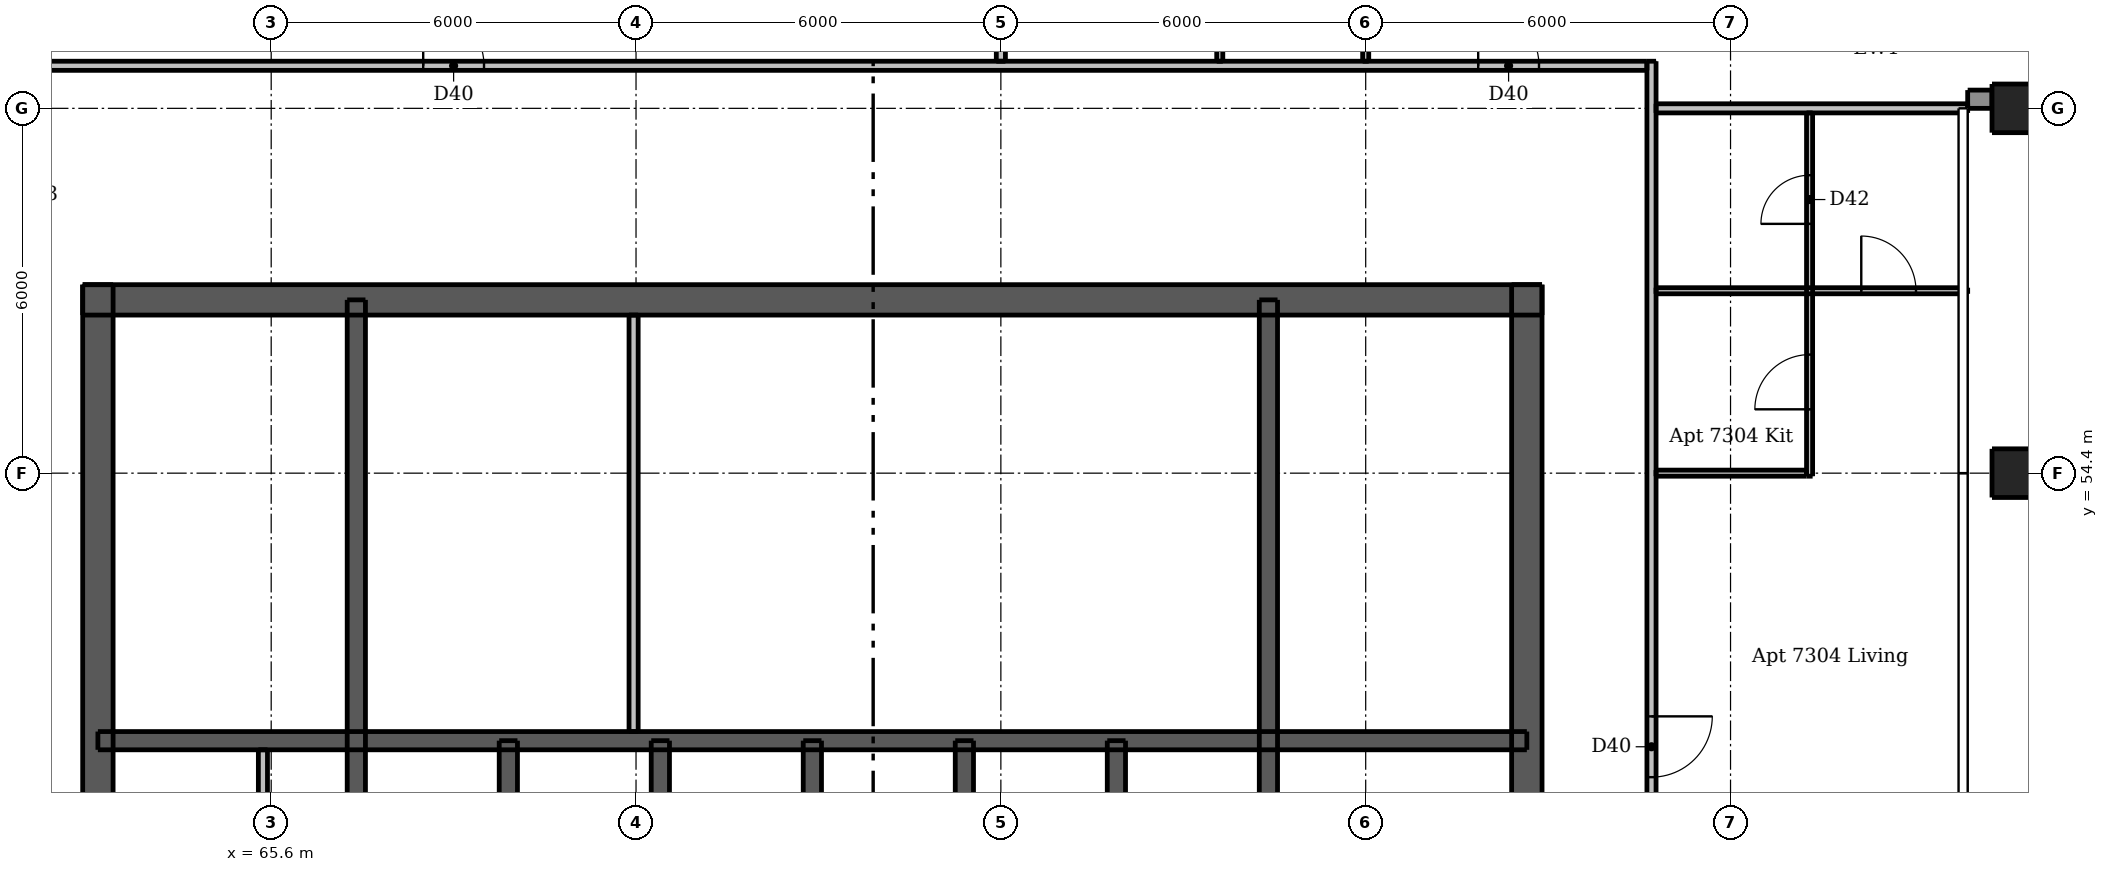
"""IFC4 building model, lengths in metres.
Left out: names, types, materials, properties, quantities, classifications, styles, units other than length and angle.
Written with IfcOpenShell. Run it as: python <this file> out.ifc"""

import sys

from ifc_helpers import new_model, si_unit, direction, frame, frame_2d, origin, origin_2d, place, context, subcontext, project, spatial, rectangle, extrude, element, fill, save


model = new_model("IFC4")
c1 = context("Model", 3, precision=1e-05, world=origin(), true_north=direction((0.0, 1.0)))
c2 = subcontext(c1, "Body", "Model", "MODEL_VIEW")
j1 = project(units=[si_unit("LENGTHUNIT", "METRE"), si_unit("PLANEANGLEUNIT", "RADIAN")], contexts=[c1])
p1 = place(None, origin())
s1 = spatial("IfcSite", under=j1, at=p1, CompositionType="ELEMENT")
p2 = place(p1, origin())
s2 = spatial("IfcBuilding", under=s1, at=p2, CompositionType="ELEMENT")
p3 = place(p2, frame((0.0, 0.0, 271.9)))
s3 = spatial("IfcBuildingStorey", under=s2, at=p3, CompositionType="ELEMENT", Elevation=271.9)
p4 = place(p3, frame((62.5, 57.25, 0.0), z_axis=(0.0, 0.0, 1.0), x_axis=(1.0, 0.0, 0.0)))
e1 = element("IfcWall", 1, at=p4, inside=s3, PredefinedType="SHEAR", context=c2, shape_type="SweptSolid", body=[
    extrude(rectangle(XDim=24.0, YDim=0.5, at=frame_2d((12.0, 0.0))), origin(), (0.0, 0.0, 1.0), 3.05),
])
p5 = place(p4, frame((21.025, 0.0, 0.0)))
e2 = element("IfcOpeningElement", 2, at=p5, cuts=e1, PredefinedType="OPENING", context=c2, shape_type="SweptSolid", body=[
    extrude(rectangle(XDim=1.1, YDim=2.1, at=frame_2d((0.55, 1.05))), frame((0.0, 0.26, 0.0), z_axis=(0.0, -1.0, 0.0), x_axis=(1.0, 0.0, 0.0)), (0.0, 0.0, 1.0), 0.52),
])
p6 = place(p4, frame((1.875, 0.0, 0.0)))
e3 = element("IfcOpeningElement", 3, at=p6, cuts=e1, PredefinedType="OPENING", context=c2, shape_type="SweptSolid", body=[
    extrude(rectangle(XDim=1.1, YDim=2.1, at=frame_2d((0.55, 1.05))), frame((0.0, 0.26, 0.0), z_axis=(0.0, -1.0, 0.0), x_axis=(1.0, 0.0, 0.0)), (0.0, 0.0, 1.0), 0.52),
])
p7 = place(p4, frame((6.405, 0.0, 0.0)))
e4 = element("IfcOpeningElement", 4, at=p7, cuts=e1, PredefinedType="OPENING", context=c2, shape_type="SweptSolid", body=[
    extrude(rectangle(XDim=0.9, YDim=2.1, at=frame_2d((0.45, 1.05))), frame((0.0, 0.26, 0.0), z_axis=(0.0, -1.0, 0.0), x_axis=(1.0, 0.0, 0.0)), (0.0, 0.0, 1.0), 0.52),
])
p8 = place(p4, frame((13.755, 0.0, 0.0)))
e5 = element("IfcOpeningElement", 5, at=p8, cuts=e1, PredefinedType="OPENING", context=c2, shape_type="SweptSolid", body=[
    extrude(rectangle(XDim=0.9, YDim=2.1, at=frame_2d((0.45, 1.05))), frame((0.0, 0.26, 0.0), z_axis=(0.0, -1.0, 0.0), x_axis=(1.0, 0.0, 0.0)), (0.0, 0.0, 1.0), 0.52),
])
p9 = place(p3, frame((62.75, 33.5, 0.0), z_axis=(0.0, 0.0, 1.0), x_axis=(0.0, 1.0, 0.0)))
e6 = element("IfcWall", 6, at=p9, inside=s3, PredefinedType="SHEAR", context=c2, shape_type="SweptSolid", body=[
    extrude(rectangle(XDim=24.0, YDim=0.5, at=frame_2d((12.0, 0.0))), origin(), (0.0, 0.0, 1.0), 3.05),
])
p10 = place(p9, frame((11.2, 0.0, 0.0)))
e7 = element("IfcOpeningElement", 7, at=p10, cuts=e6, PredefinedType="OPENING", context=c2, shape_type="SweptSolid", body=[
    extrude(rectangle(XDim=1.6, YDim=2.1, at=frame_2d((0.8, 1.05))), frame((0.0, 0.26, 0.0), z_axis=(0.0, -1.0, 0.0), x_axis=(1.0, 0.0, 0.0)), (0.0, 0.0, 1.0), 0.52),
])
p11 = place(p3, frame((86.25, 33.5, 0.0), z_axis=(0.0, 0.0, 1.0), x_axis=(0.0, 1.0, 0.0)))
e8 = element("IfcWall", 8, at=p11, inside=s3, PredefinedType="SHEAR", context=c2, shape_type="SweptSolid", body=[
    extrude(rectangle(XDim=24.0, YDim=0.5, at=frame_2d((12.0, 0.0))), origin(), (0.0, 0.0, 1.0), 3.05),
])
p12 = place(p11, frame((11.2, 0.0, 0.0)))
e9 = element("IfcOpeningElement", 9, at=p12, cuts=e8, PredefinedType="OPENING", context=c2, shape_type="SweptSolid", body=[
    extrude(rectangle(XDim=1.6, YDim=2.1, at=frame_2d((0.8, 1.05))), frame((0.0, 0.26, 0.0), z_axis=(0.0, -1.0, 0.0), x_axis=(1.0, 0.0, 0.0)), (0.0, 0.0, 1.0), 0.52),
])
p13 = place(p3, frame((62.75, 50.0, 0.0), z_axis=(0.0, 0.0, 1.0), x_axis=(1.0, 0.0, 0.0)))
e10 = element("IfcWall", 10, at=p13, inside=s3, PredefinedType="SHEAR", context=c2, shape_type="SweptSolid", body=[
    extrude(rectangle(XDim=23.5, YDim=0.3, at=frame_2d((11.75, 0.0))), origin(), (0.0, 0.0, 1.0), 3.05),
])
for number, where, z_axis, x_axis in (
    (11, (67.0, 47.1, 0.0), (0.0, 0.0, 1.0), (0.0, 1.0, 0.0)),
    (12, (82.0, 47.1, 0.0), (0.0, 0.0, 1.0), (0.0, 1.0, 0.0)),
):
    element("IfcWall", number, at=place(p3, frame(where, z_axis=z_axis, x_axis=x_axis)), inside=s3, PredefinedType="SHEAR", context=c2, shape_type="SweptSolid", body=[
        extrude(rectangle(XDim=10.15, YDim=0.3, at=frame_2d((5.075, 0.0))), origin(), (0.0, 0.0, 1.0), 3.05),
    ])
for number, where, z_axis, x_axis in (
    (13, (69.5, 47.1, 0.0), (0.0, 0.0, 1.0), (0.0, 1.0, 0.0)),
    (14, (72.0, 47.1, 0.0), (0.0, 0.0, 1.0), (0.0, 1.0, 0.0)),
    (15, (74.5, 47.1, 0.0), (0.0, 0.0, 1.0), (0.0, 1.0, 0.0)),
    (16, (77.0, 47.1, 0.0), (0.0, 0.0, 1.0), (0.0, 1.0, 0.0)),
    (17, (79.5, 47.1, 0.0), (0.0, 0.0, 1.0), (0.0, 1.0, 0.0)),
):
    element("IfcWall", number, at=place(p3, frame(where, z_axis=z_axis, x_axis=x_axis)), inside=s3, PredefinedType="SHEAR", context=c2, shape_type="SweptSolid", body=[
        extrude(rectangle(XDim=2.9, YDim=0.3, at=frame_2d((1.45, 0.0))), origin(), (0.0, 0.0, 1.0), 3.05),
    ])
for number, where, z_axis, x_axis in (
    (18, (94.3, 54.4, 0.0), (0.0, 0.0, 1.0), (1.0, 0.0, 0.0)),
    (19, (94.3, 60.4, 0.0), (0.0, 0.0, 1.0), (1.0, 0.0, 0.0)),
):
    element("IfcColumn", number, at=place(p3, frame(where, z_axis=z_axis, x_axis=x_axis)), inside=s3, PredefinedType="COLUMN", context=c2, shape_type="SweptSolid", body=[
        extrude(rectangle(XDim=0.8, YDim=0.8, at=origin_2d()), origin(), (0.0, 0.0, 1.0), 3.05),
    ])
p14 = place(p3, frame((93.5, 60.55, 0.0), z_axis=(0.0, 0.0, 1.0), x_axis=(1.0, 0.0, 0.0)))
e20 = element("IfcWall", 20, at=p14, inside=s3, PredefinedType="SOLIDWALL", context=c2, shape_type="SweptSolid", body=[
    extrude(rectangle(XDim=0.4, YDim=0.3, at=frame_2d((0.2, 0.0))), origin(), (0.0, 0.0, 1.0), 3.05),
])
p15 = place(p3, frame((65.464, 47.25, 0.0), z_axis=(0.0, 0.0, 1.0), x_axis=(0.0, 1.0, 0.0)))
e21 = element("IfcWall", 21, at=p15, inside=s3, PredefinedType="PLUMBINGWALL", context=c2, shape_type="SweptSolid", body=[
    extrude(rectangle(XDim=2.6, YDim=0.15, at=frame_2d((1.3, 0.0))), origin(), (0.0, 0.0, 1.0), 3.05),
])
p16 = place(p3, frame((71.56, 50.15, 0.0), z_axis=(0.0, 0.0, 1.0), x_axis=(0.0, 1.0, 0.0)))
e22 = element("IfcWall", 22, at=p16, inside=s3, PredefinedType="PLUMBINGWALL", context=c2, shape_type="SweptSolid", body=[
    extrude(rectangle(XDim=6.85, YDim=0.15, at=frame_2d((3.425, 0.0))), origin(), (0.0, 0.0, 1.0), 3.05),
])
p17 = place(p3, frame((81.2, 61.175, 0.0), z_axis=(0.0, 0.0, 1.0), x_axis=(0.0, 1.0, 0.0)))
e23 = element("IfcWall", 23, at=p17, inside=s3, PredefinedType="PARTITIONING", context=c2, shape_type="SweptSolid", body=[
    extrude(rectangle(XDim=1.975, YDim=0.1, at=frame_2d((0.987, 0.0))), origin(), (0.0, 0.0, 1.0), 3.05),
])
p18 = place(p3, frame((83.6, 61.175, 0.0), z_axis=(0.0, 0.0, 1.0), x_axis=(0.0, 1.0, 0.0)))
e24 = element("IfcWall", 24, at=p18, inside=s3, PredefinedType="PARTITIONING", context=c2, shape_type="SweptSolid", body=[
    extrude(rectangle(XDim=6.825, YDim=0.1, at=frame_2d((3.413, 0.0))), origin(), (0.0, 0.0, 1.0), 2.516),
])
p19 = place(p18, frame((0.525, 0.0, 0.0)))
e25 = element("IfcOpeningElement", 25, at=p19, cuts=e24, PredefinedType="OPENING", context=c2, shape_type="SweptSolid", body=[
    extrude(rectangle(XDim=0.9, YDim=2.1, at=frame_2d((0.45, 1.05))), frame((0.0, 0.06, 0.0), z_axis=(0.0, -1.0, 0.0), x_axis=(1.0, 0.0, 0.0)), (0.0, 0.0, 1.0), 0.12),
])
p20 = place(p18, frame((3.975, 0.0, 0.0)))
e26 = element("IfcOpeningElement", 26, at=p20, cuts=e24, PredefinedType="OPENING", context=c2, shape_type="SweptSolid", body=[
    extrude(rectangle(XDim=0.9, YDim=2.1, at=frame_2d((0.45, 1.05))), frame((0.0, 0.06, 0.0), z_axis=(0.0, -1.0, 0.0), x_axis=(1.0, 0.0, 0.0)), (0.0, 0.0, 1.0), 0.12),
])
p21 = place(p3, frame((90.9, 54.35, 0.0), z_axis=(0.0, 0.0, 1.0), x_axis=(0.0, 1.0, 0.0)))
e27 = element("IfcWall", 27, at=p21, inside=s3, PredefinedType="PARTITIONING", context=c2, shape_type="SweptSolid", body=[
    extrude(rectangle(XDim=5.975, YDim=0.1, at=frame_2d((2.987, 0.0))), origin(), (0.0, 0.0, 1.0), 3.05),
])
p22 = place(p21, frame((1.1, 0.0, 0.0)))
e28 = element("IfcOpeningElement", 28, at=p22, cuts=e27, PredefinedType="OPENING", context=c2, shape_type="SweptSolid", body=[
    extrude(rectangle(XDim=0.9, YDim=2.1, at=frame_2d((0.45, 1.05))), frame((0.0, 0.06, 0.0), z_axis=(0.0, -1.0, 0.0), x_axis=(1.0, 0.0, 0.0)), (0.0, 0.0, 1.0), 0.12),
])
p23 = place(p21, frame((4.15, 0.0, 0.0)))
e29 = element("IfcOpeningElement", 29, at=p23, cuts=e27, PredefinedType="OPENING", context=c2, shape_type="SweptSolid", body=[
    extrude(rectangle(XDim=0.8, YDim=2.1, at=frame_2d((0.4, 1.05))), frame((0.0, 0.06, 0.0), z_axis=(0.0, -1.0, 0.0), x_axis=(1.0, 0.0, 0.0)), (0.0, 0.0, 1.0), 0.12),
])
p24 = place(p3, frame((88.375, 57.4, 0.0), z_axis=(0.0, 0.0, 1.0), x_axis=(1.0, 0.0, 0.0)))
e30 = element("IfcWall", 30, at=p24, inside=s3, PredefinedType="PARTITIONING", context=c2, shape_type="SweptSolid", body=[
    extrude(rectangle(XDim=5.125, YDim=0.1, at=frame_2d((2.562, 0.0))), origin(), (0.0, 0.0, 1.0), 3.05),
])
p25 = place(p24, frame((3.375, 0.0, 0.0)))
e31 = element("IfcOpeningElement", 31, at=p25, cuts=e30, PredefinedType="OPENING", context=c2, shape_type="SweptSolid", body=[
    extrude(rectangle(XDim=0.9, YDim=2.1, at=frame_2d((0.45, 1.05))), frame((0.0, 0.06, 0.0), z_axis=(0.0, -1.0, 0.0), x_axis=(1.0, 0.0, 0.0)), (0.0, 0.0, 1.0), 0.12),
])
p26 = place(p3, frame((88.375, 54.4, 0.0), z_axis=(0.0, 0.0, 1.0), x_axis=(1.0, 0.0, 0.0)))
e32 = element("IfcWall", 32, at=p26, inside=s3, PredefinedType="PARTITIONING", context=c2, shape_type="SweptSolid", body=[
    extrude(rectangle(XDim=2.475, YDim=0.1, at=frame_2d((1.238, 0.0))), origin(), (0.0, 0.0, 1.0), 2.59),
])
p27 = place(p3, frame((77.6, 61.175, 0.0), z_axis=(0.0, 0.0, 1.0), x_axis=(0.0, 1.0, 0.0)))
e33 = element("IfcWall", 33, at=p27, inside=s3, PredefinedType="PARTITIONING", context=c2, shape_type="SweptSolid", body=[
    extrude(rectangle(XDim=6.825, YDim=0.15, at=frame_2d((3.413, 0.0))), origin(), (0.0, 0.0, 1.0), 2.516),
])
p28 = place(p3, frame((88.3, 61.175, 0.0), z_axis=(0.0, 0.0, 1.0), x_axis=(0.0, -1.0, 0.0)))
e34 = element("IfcWall", 34, at=p28, inside=s3, PredefinedType="PARTITIONING", context=c2, shape_type="SweptSolid", body=[
    extrude(rectangle(XDim=29.4, YDim=0.15, at=frame_2d((14.7, 0.0))), origin(), (0.0, 0.0, 1.0), 3.05),
])
p29 = place(p28, frame((28.113, 0.0, 0.0)))
e35 = element("IfcOpeningElement", 35, at=p29, cuts=e34, PredefinedType="OPENING", context=c2, shape_type="SweptSolid", body=[
    extrude(rectangle(XDim=1.0, YDim=2.1, at=frame_2d((0.5, 1.05))), frame((0.0, 0.085, 0.0), z_axis=(0.0, -1.0, 0.0), x_axis=(1.0, 0.0, 0.0)), (0.0, 0.0, 1.0), 0.17),
])
p30 = place(p28, frame((10.775, 0.0, 0.0)))
e36 = element("IfcOpeningElement", 36, at=p30, cuts=e34, PredefinedType="OPENING", context=c2, shape_type="SweptSolid", body=[
    extrude(rectangle(XDim=1.0, YDim=2.1, at=frame_2d((0.5, 1.05))), frame((0.0, 0.085, 0.0), z_axis=(0.0, -1.0, 0.0), x_axis=(1.0, 0.0, 0.0)), (0.0, 0.0, 1.0), 0.17),
])
p31 = place(p3, frame((58.975, 61.1, 0.0), z_axis=(0.0, 0.0, 1.0), x_axis=(1.0, 0.0, 0.0)))
e37 = element("IfcWall", 37, at=p31, inside=s3, PredefinedType="PARTITIONING", context=c2, shape_type="SweptSolid", body=[
    extrude(rectangle(XDim=29.25, YDim=0.15, at=frame_2d((14.625, 0.0))), origin(), (0.0, 0.0, 1.0), 3.05),
])
p32 = place(p31, frame((9.125, 0.0, 0.0)))
e38 = element("IfcOpeningElement", 38, at=p32, cuts=e37, PredefinedType="OPENING", context=c2, shape_type="SweptSolid", body=[
    extrude(rectangle(XDim=1.0, YDim=2.1, at=frame_2d((0.5, 1.05))), frame((0.0, 0.085, 0.0), z_axis=(0.0, -1.0, 0.0), x_axis=(1.0, 0.0, 0.0)), (0.0, 0.0, 1.0), 0.17),
])
p33 = place(p31, frame((26.475, 0.0, 0.0)))
e39 = element("IfcOpeningElement", 39, at=p33, cuts=e37, PredefinedType="OPENING", context=c2, shape_type="SweptSolid", body=[
    extrude(rectangle(XDim=1.0, YDim=2.1, at=frame_2d((0.5, 1.05))), frame((0.0, 0.085, 0.0), z_axis=(0.0, -1.0, 0.0), x_axis=(1.0, 0.0, 0.0)), (0.0, 0.0, 1.0), 0.17),
])
p34 = place(p3, frame((88.375, 60.4, 0.0), z_axis=(0.0, 0.0, 1.0), x_axis=(1.0, 0.0, 0.0)))
e40 = element("IfcWall", 40, at=p34, inside=s3, PredefinedType="PARTITIONING", context=c2, shape_type="SweptSolid", body=[
    extrude(rectangle(XDim=5.125, YDim=0.15, at=frame_2d((2.562, 0.0))), origin(), (0.0, 0.0, 1.0), 2.647),
])
p35 = place(p5, origin())
e41 = element("IfcDoor", 41, at=p35, inside=s3, OperationType="SINGLE_SWING_RIGHT", PredefinedType="DOOR", context=c2, shape_type="SweptSolid", body=[
    extrude(rectangle(XDim=1.1, YDim=2.1, at=frame_2d((0.55, 1.05))), frame((0.0, -0.188, 0.0), z_axis=(0.0, -1.0, 0.0), x_axis=(1.0, 0.0, 0.0)), (0.0, 0.0, 1.0), 0.05),
])
fill(e2, e41)
p36 = place(p6, origin())
e42 = element("IfcDoor", 42, at=p36, inside=s3, OperationType="SINGLE_SWING_LEFT", PredefinedType="DOOR", context=c2, shape_type="SweptSolid", body=[
    extrude(rectangle(XDim=1.1, YDim=2.1, at=frame_2d((0.55, 1.05))), frame((0.0, -0.188, 0.0), z_axis=(0.0, -1.0, 0.0), x_axis=(1.0, 0.0, 0.0)), (0.0, 0.0, 1.0), 0.05),
])
fill(e3, e42)
p37 = place(p7, origin())
e43 = element("IfcDoor", 43, at=p37, inside=s3, OperationType="SINGLE_SWING_RIGHT", PredefinedType="DOOR", context=c2, shape_type="SweptSolid", body=[
    extrude(rectangle(XDim=0.9, YDim=2.1, at=frame_2d((0.45, 1.05))), frame((0.0, -0.188, 0.0), z_axis=(0.0, -1.0, 0.0), x_axis=(1.0, 0.0, 0.0)), (0.0, 0.0, 1.0), 0.05),
])
fill(e4, e43)
p38 = place(p8, origin())
e44 = element("IfcDoor", 44, at=p38, inside=s3, OperationType="SINGLE_SWING_RIGHT", PredefinedType="DOOR", context=c2, shape_type="SweptSolid", body=[
    extrude(rectangle(XDim=0.9, YDim=2.1, at=frame_2d((0.45, 1.05))), frame((0.0, -0.188, 0.0), z_axis=(0.0, -1.0, 0.0), x_axis=(1.0, 0.0, 0.0)), (0.0, 0.0, 1.0), 0.05),
])
fill(e5, e44)
p39 = place(p30, origin())
e45 = element("IfcDoor", 45, at=p39, inside=s3, OperationType="SINGLE_SWING_LEFT", PredefinedType="DOOR", context=c2, shape_type="SweptSolid", body=[
    extrude(rectangle(XDim=1.0, YDim=2.1, at=frame_2d((0.5, 1.05))), frame((0.0, 0.025, 0.0), z_axis=(0.0, -1.0, 0.0), x_axis=(1.0, 0.0, 0.0)), (0.0, 0.0, 1.0), 0.05),
])
fill(e36, e45)
p40 = place(p22, origin())
e46 = element("IfcDoor", 46, at=p40, inside=s3, OperationType="SINGLE_SWING_LEFT", PredefinedType="DOOR", context=c2, shape_type="SweptSolid", body=[
    extrude(rectangle(XDim=0.9, YDim=2.1, at=frame_2d((0.45, 1.05))), frame((0.0, 0.025, 0.0), z_axis=(0.0, -1.0, 0.0), x_axis=(1.0, 0.0, 0.0)), (0.0, 0.0, 1.0), 0.05),
])
fill(e28, e46)
p41 = place(p25, origin())
e47 = element("IfcDoor", 47, at=p41, inside=s3, OperationType="SINGLE_SWING_LEFT", PredefinedType="DOOR", context=c2, shape_type="SweptSolid", body=[
    extrude(rectangle(XDim=0.9, YDim=2.1, at=frame_2d((0.45, 1.05))), frame((0.0, 0.025, 0.0), z_axis=(0.0, -1.0, 0.0), x_axis=(1.0, 0.0, 0.0)), (0.0, 0.0, 1.0), 0.05),
])
fill(e31, e47)
p42 = place(p23, origin())
e48 = element("IfcDoor", 48, at=p42, inside=s3, OperationType="SINGLE_SWING_LEFT", PredefinedType="DOOR", context=c2, shape_type="SweptSolid", body=[
    extrude(rectangle(XDim=0.8, YDim=2.1, at=frame_2d((0.4, 1.05))), frame((0.0, 0.025, 0.0), z_axis=(0.0, -1.0, 0.0), x_axis=(1.0, 0.0, 0.0)), (0.0, 0.0, 1.0), 0.05),
])
fill(e29, e48)
p43 = place(p32, origin())
e49 = element("IfcDoor", 49, at=p43, inside=s3, OperationType="SINGLE_SWING_LEFT", PredefinedType="DOOR", context=c2, shape_type="SweptSolid", body=[
    extrude(rectangle(XDim=1.0, YDim=2.1, at=frame_2d((0.5, 1.05))), frame((0.0, 0.025, 0.0), z_axis=(0.0, -1.0, 0.0), x_axis=(1.0, 0.0, 0.0)), (0.0, 0.0, 1.0), 0.05),
])
fill(e38, e49)
p44 = place(p33, origin())
e50 = element("IfcDoor", 50, at=p44, inside=s3, OperationType="SINGLE_SWING_LEFT", PredefinedType="DOOR", context=c2, shape_type="SweptSolid", body=[
    extrude(rectangle(XDim=1.0, YDim=2.1, at=frame_2d((0.5, 1.05))), frame((0.0, 0.025, 0.0), z_axis=(0.0, -1.0, 0.0), x_axis=(1.0, 0.0, 0.0)), (0.0, 0.0, 1.0), 0.05),
])
fill(e39, e50)
save(model, sys.argv[1])
